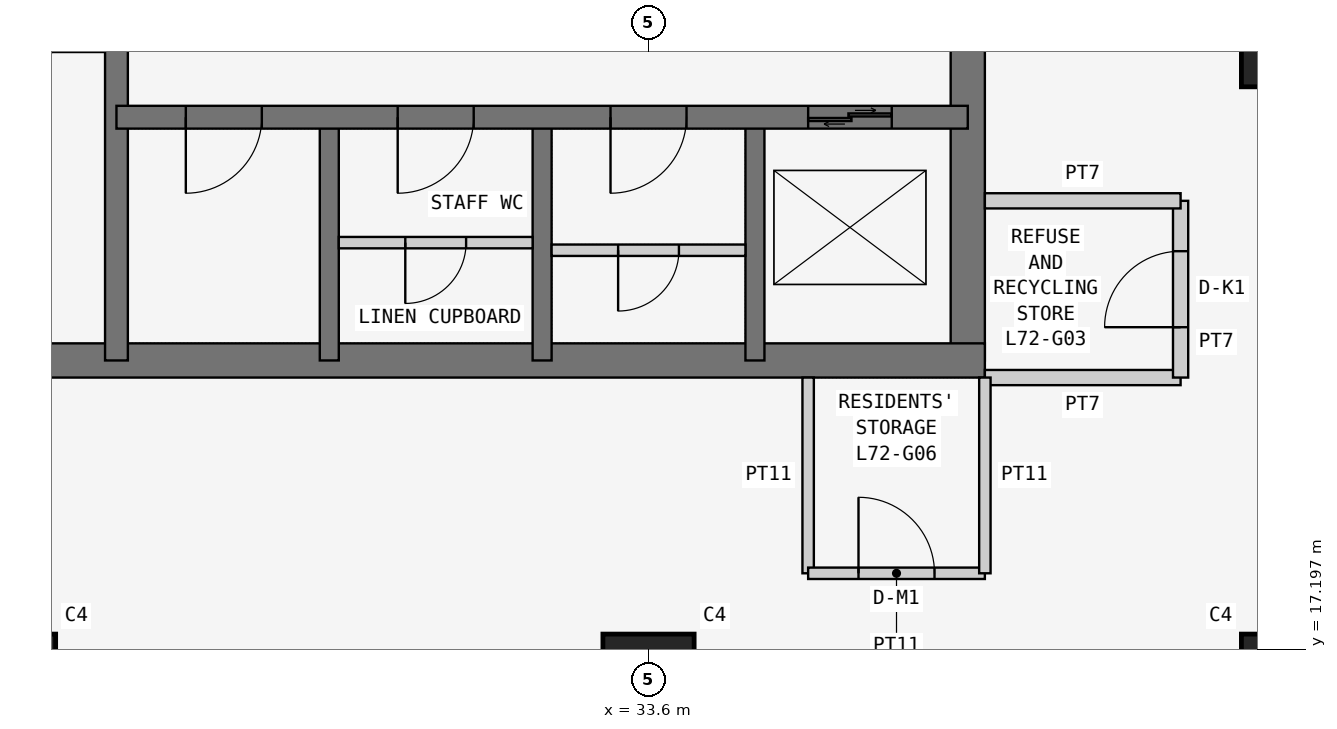
"""IFC4 building model, lengths in metres.
Left out: names, types, materials, properties, quantities, classifications, styles, units other than length and angle.
Written with IfcOpenShell. Run it as: python <this file> out.ifc"""

import sys

from ifc_helpers import new_model, si_unit, direction, frame, frame_2d, origin, origin_2d, place, context, subcontext, project, spatial, rectangle, extrude, element, fill, save


model = new_model("IFC4")
c1 = context("Model", 3, precision=1e-05, world=origin(), true_north=direction((0.0, 1.0)))
c2 = subcontext(c1, "Body", "Model", "MODEL_VIEW")
j1 = project(units=[si_unit("LENGTHUNIT", "METRE"), si_unit("PLANEANGLEUNIT", "RADIAN")], contexts=[c1])
p1 = place(None, origin())
s1 = spatial("IfcSite", under=j1, at=p1, CompositionType="ELEMENT")
p2 = place(p1, origin())
s2 = spatial("IfcBuilding", under=s1, at=p2, CompositionType="ELEMENT")
p3 = place(p2, frame((0.0, 0.0, 275.7)))
s3 = spatial("IfcBuildingStorey", under=s2, at=p3, CompositionType="ELEMENT", Elevation=275.7)
for number, where, z_axis, x_axis in (
    (1, (25.2, 16.8, 0.0), (0.0, 0.0, 1.0), (1.0, 0.0, 0.0)),
    (2, (33.6, 16.8, 0.0), (0.0, 0.0, 1.0), (1.0, 0.0, 0.0)),
    (3, (42.0, 16.8, 0.0), (0.0, 0.0, 1.0), (1.0, 0.0, 0.0)),
    (4, (42.0, 25.2, 0.0), (0.0, 0.0, 1.0), (1.0, 0.0, 0.0)),
):
    element("IfcColumn", number, at=place(p3, frame(where, z_axis=z_axis, x_axis=x_axis)), inside=s3, PredefinedType="COLUMN", context=c2, shape_type="SweptSolid", body=[
        extrude(rectangle(XDim=1.2, YDim=1.2, at=origin_2d()), origin(), (0.0, 0.0, 1.0), 3.6),
    ])
p4 = place(p3, frame((21.0, 21.0, 0.0), z_axis=(0.0, 0.0, 1.0), x_axis=(1.0, 0.0, 0.0)))
e5 = element("IfcWall", 5, at=p4, inside=s3, PredefinedType="SHEAR", context=c2, shape_type="SweptSolid", body=[
    extrude(rectangle(XDim=17.025, YDim=0.45, at=frame_2d((8.512, 0.0))), origin(), (0.0, 0.0, 1.0), 3.6),
])
p5 = place(p3, frame((37.8, 21.0, 0.0), z_axis=(0.0, 0.0, 1.0), x_axis=(0.0, 1.0, 0.0)))
e6 = element("IfcWall", 6, at=p5, inside=s3, PredefinedType="SHEAR", context=c2, shape_type="SweptSolid", body=[
    extrude(rectangle(XDim=17.025, YDim=0.45, at=frame_2d((8.512, 0.0))), origin(), (0.0, 0.0, 1.0), 3.6),
])
p6 = place(p5, frame((5.2, 0.0, 0.0)))
e7 = element("IfcOpeningElement", 7, at=p6, cuts=e6, PredefinedType="OPENING", context=c2, shape_type="SweptSolid", body=[
    extrude(rectangle(XDim=1.2, YDim=2.1, at=frame_2d((0.6, 1.05))), frame((0.0, 0.235, 0.0), z_axis=(0.0, -1.0, 0.0), x_axis=(1.0, 0.0, 0.0)), (0.0, 0.0, 1.0), 0.47),
])
p7 = place(p3, frame((26.6, 21.0, 0.0), z_axis=(0.0, 0.0, 1.0), x_axis=(0.0, 1.0, 0.0)))
e8 = element("IfcWall", 8, at=p7, inside=s3, PredefinedType="SHEAR", context=c2, shape_type="SweptSolid", body=[
    extrude(rectangle(XDim=16.8, YDim=0.3, at=frame_2d((8.4, 0.0))), origin(), (0.0, 0.0, 1.0), 3.6),
])
p8 = place(p7, frame((10.4, 0.0, 0.0)))
e9 = element("IfcOpeningElement", 9, at=p8, cuts=e8, PredefinedType="OPENING", context=c2, shape_type="SweptSolid", body=[
    extrude(rectangle(XDim=1.2, YDim=2.1, at=frame_2d((0.6, 1.05))), frame((0.0, 0.16, 0.0), z_axis=(0.0, -1.0, 0.0), x_axis=(1.0, 0.0, 0.0)), (0.0, 0.0, 1.0), 0.32),
])
p9 = place(p3, frame((26.6, 24.2, 0.0), z_axis=(0.0, 0.0, 1.0), x_axis=(1.0, 0.0, 0.0)))
e10 = element("IfcWall", 10, at=p9, inside=s3, PredefinedType="SHEAR", context=c2, shape_type="SweptSolid", body=[
    extrude(rectangle(XDim=11.2, YDim=0.3, at=frame_2d((5.6, 0.0))), origin(), (0.0, 0.0, 1.0), 3.6),
])
p10 = place(p9, frame((0.913, 0.0, 0.0)))
e11 = element("IfcOpeningElement", 11, at=p10, cuts=e10, PredefinedType="OPENING", context=c2, shape_type="SweptSolid", body=[
    extrude(rectangle(XDim=1.0, YDim=2.1, at=frame_2d((0.5, 1.05))), frame((0.0, 0.16, 0.0), z_axis=(0.0, -1.0, 0.0), x_axis=(1.0, 0.0, 0.0)), (0.0, 0.0, 1.0), 0.32),
])
p11 = place(p9, frame((3.7, 0.0, 0.0)))
e12 = element("IfcOpeningElement", 12, at=p11, cuts=e10, PredefinedType="OPENING", context=c2, shape_type="SweptSolid", body=[
    extrude(rectangle(XDim=1.0, YDim=2.1, at=frame_2d((0.5, 1.05))), frame((0.0, 0.16, 0.0), z_axis=(0.0, -1.0, 0.0), x_axis=(1.0, 0.0, 0.0)), (0.0, 0.0, 1.0), 0.32),
])
p12 = place(p9, frame((6.5, 0.0, 0.0)))
e13 = element("IfcOpeningElement", 13, at=p12, cuts=e10, PredefinedType="OPENING", context=c2, shape_type="SweptSolid", body=[
    extrude(rectangle(XDim=1.0, YDim=2.1, at=frame_2d((0.5, 1.05))), frame((0.0, 0.16, 0.0), z_axis=(0.0, -1.0, 0.0), x_axis=(1.0, 0.0, 0.0)), (0.0, 0.0, 1.0), 0.32),
])
p13 = place(p9, frame((9.1, 0.0, 0.0)))
e14 = element("IfcOpeningElement", 14, at=p13, cuts=e10, PredefinedType="OPENING", context=c2, shape_type="SweptSolid", body=[
    extrude(rectangle(XDim=1.1, YDim=2.1, at=frame_2d((0.55, 1.05))), frame((0.0, 0.16, 0.0), z_axis=(0.0, -1.0, 0.0), x_axis=(1.0, 0.0, 0.0)), (0.0, 0.0, 1.0), 0.32),
])
for number, where, z_axis, x_axis in (
    (15, (29.4, 21.0, 0.0), (0.0, 0.0, 1.0), (0.0, 1.0, 0.0)),
    (16, (32.2, 21.0, 0.0), (0.0, 0.0, 1.0), (0.0, 1.0, 0.0)),
    (17, (35.0, 21.0, 0.0), (0.0, 0.0, 1.0), (0.0, 1.0, 0.0)),
):
    element("IfcWall", number, at=place(p3, frame(where, z_axis=z_axis, x_axis=x_axis)), inside=s3, PredefinedType="SHEAR", context=c2, shape_type="SweptSolid", body=[
        extrude(rectangle(XDim=3.2, YDim=0.25, at=frame_2d((1.6, 0.0))), origin(), (0.0, 0.0, 1.0), 3.6),
    ])
p14 = place(p3, frame((38.025, 20.775, 0.0), z_axis=(0.0, 0.0, 1.0), x_axis=(1.0, 0.0, 0.0)))
e18 = element("IfcWall", 18, at=p14, inside=s3, PredefinedType="PARTITIONING", context=c2, shape_type="SweptSolid", body=[
    extrude(rectangle(XDim=2.575, YDim=0.2, at=frame_2d((1.288, 0.0))), origin(), (0.0, 0.0, 1.0), 3.45),
])
p15 = place(p3, frame((40.6, 20.775, 0.0), z_axis=(0.0, 0.0, 1.0), x_axis=(0.0, 1.0, 0.0)))
e19 = element("IfcWall", 19, at=p15, inside=s3, PredefinedType="PARTITIONING", context=c2, shape_type="SweptSolid", body=[
    extrude(rectangle(XDim=2.325, YDim=0.2, at=frame_2d((1.163, 0.0))), origin(), (0.0, 0.0, 1.0), 3.45),
])
p16 = place(p15, frame((0.663, 0.0, 0.0)))
e20 = element("IfcOpeningElement", 20, at=p16, cuts=e19, PredefinedType="OPENING", context=c2, shape_type="SweptSolid", body=[
    extrude(rectangle(XDim=1.0, YDim=2.1, at=frame_2d((0.5, 1.05))), frame((0.0, 0.11, 0.0), z_axis=(0.0, -1.0, 0.0), x_axis=(1.0, 0.0, 0.0)), (0.0, 0.0, 1.0), 0.22),
])
p17 = place(p3, frame((40.6, 23.1, 0.0), z_axis=(0.0, 0.0, 1.0), x_axis=(-1.0, 0.0, 0.0)))
e21 = element("IfcWall", 21, at=p17, inside=s3, PredefinedType="PARTITIONING", context=c2, shape_type="SweptSolid", body=[
    extrude(rectangle(XDim=2.575, YDim=0.2, at=frame_2d((1.288, 0.0))), origin(), (0.0, 0.0, 1.0), 3.45),
])
p18 = place(p3, frame((35.7, 20.775, 0.0), z_axis=(0.0, 0.0, 1.0), x_axis=(0.0, -1.0, 0.0)))
e22 = element("IfcWall", 22, at=p18, inside=s3, PredefinedType="PARTITIONING", context=c2, shape_type="SweptSolid", body=[
    extrude(rectangle(XDim=2.575, YDim=0.15, at=frame_2d((1.288, 0.0))), origin(), (0.0, 0.0, 1.0), 3.45),
])
p19 = place(p3, frame((35.7, 18.2, 0.0), z_axis=(0.0, 0.0, 1.0), x_axis=(1.0, 0.0, 0.0)))
e23 = element("IfcWall", 23, at=p19, inside=s3, PredefinedType="PARTITIONING", context=c2, shape_type="SweptSolid", body=[
    extrude(rectangle(XDim=2.325, YDim=0.15, at=frame_2d((1.163, 0.0))), origin(), (0.0, 0.0, 1.0), 3.45),
])
p20 = place(p19, frame((0.663, 0.0, 0.0)))
e24 = element("IfcOpeningElement", 24, at=p20, cuts=e23, PredefinedType="OPENING", context=c2, shape_type="SweptSolid", body=[
    extrude(rectangle(XDim=1.0, YDim=2.1, at=frame_2d((0.5, 1.05))), frame((0.0, 0.085, 0.0), z_axis=(0.0, -1.0, 0.0), x_axis=(1.0, 0.0, 0.0)), (0.0, 0.0, 1.0), 0.17),
])
p21 = place(p3, frame((38.025, 18.2, 0.0), z_axis=(0.0, 0.0, 1.0), x_axis=(0.0, 1.0, 0.0)))
e25 = element("IfcWall", 25, at=p21, inside=s3, PredefinedType="PARTITIONING", context=c2, shape_type="SweptSolid", body=[
    extrude(rectangle(XDim=2.575, YDim=0.15, at=frame_2d((1.288, 0.0))), origin(), (0.0, 0.0, 1.0), 3.45),
])
p22 = place(p3, frame((29.525, 22.55, 0.0), z_axis=(0.0, 0.0, 1.0), x_axis=(1.0, 0.0, 0.0)))
e26 = element("IfcWall", 26, at=p22, inside=s3, PredefinedType="PARTITIONING", context=c2, shape_type="SweptSolid", body=[
    extrude(rectangle(XDim=2.55, YDim=0.15, at=frame_2d((1.275, 0.0))), origin(), (0.0, 0.0, 1.0), 3.45),
])
p23 = place(p22, frame((0.875, 0.0, 0.0)))
e27 = element("IfcOpeningElement", 27, at=p23, cuts=e26, PredefinedType="OPENING", context=c2, shape_type="SweptSolid", body=[
    extrude(rectangle(XDim=0.8, YDim=2.1, at=frame_2d((0.4, 1.05))), frame((0.0, 0.085, 0.0), z_axis=(0.0, -1.0, 0.0), x_axis=(1.0, 0.0, 0.0)), (0.0, 0.0, 1.0), 0.17),
])
p24 = place(p3, frame((32.325, 22.45, 0.0), z_axis=(0.0, 0.0, 1.0), x_axis=(1.0, 0.0, 0.0)))
e28 = element("IfcWall", 28, at=p24, inside=s3, PredefinedType="PARTITIONING", context=c2, shape_type="SweptSolid", body=[
    extrude(rectangle(XDim=2.55, YDim=0.15, at=frame_2d((1.275, 0.0))), origin(), (0.0, 0.0, 1.0), 3.45),
])
p25 = place(p24, frame((0.875, 0.0, 0.0)))
e29 = element("IfcOpeningElement", 29, at=p25, cuts=e28, PredefinedType="OPENING", context=c2, shape_type="SweptSolid", body=[
    extrude(rectangle(XDim=0.8, YDim=2.1, at=frame_2d((0.4, 1.05))), frame((0.0, 0.085, 0.0), z_axis=(0.0, -1.0, 0.0), x_axis=(1.0, 0.0, 0.0)), (0.0, 0.0, 1.0), 0.17),
])
p26 = place(p16, origin())
e30 = element("IfcDoor", 30, at=p26, inside=s3, OperationType="SINGLE_SWING_LEFT", PredefinedType="DOOR", context=c2, shape_type="SweptSolid", body=[
    extrude(rectangle(XDim=1.0, YDim=2.1, at=frame_2d((0.5, 1.05))), frame((0.0, 0.025, 0.0), z_axis=(0.0, -1.0, 0.0), x_axis=(1.0, 0.0, 0.0)), (0.0, 0.0, 1.0), 0.05),
])
fill(e20, e30)
p27 = place(p20, origin())
e31 = element("IfcDoor", 31, at=p27, inside=s3, OperationType="SINGLE_SWING_LEFT", PredefinedType="DOOR", context=c2, shape_type="SweptSolid", body=[
    extrude(rectangle(XDim=1.0, YDim=2.1, at=frame_2d((0.5, 1.05))), frame((0.0, 0.025, 0.0), z_axis=(0.0, -1.0, 0.0), x_axis=(1.0, 0.0, 0.0)), (0.0, 0.0, 1.0), 0.05),
])
fill(e24, e31)
p28 = place(p10, frame((1.0, 0.0, 0.0), z_axis=(0.0, 0.0, 1.0), x_axis=(-1.0, 0.0, 0.0)))
e32 = element("IfcDoor", 32, at=p28, inside=s3, OperationType="SINGLE_SWING_RIGHT", PredefinedType="DOOR", context=c2, shape_type="SweptSolid", body=[
    extrude(rectangle(XDim=1.0, YDim=2.1, at=frame_2d((0.5, 1.05))), frame((0.0, 0.025, 0.0), z_axis=(0.0, -1.0, 0.0), x_axis=(1.0, 0.0, 0.0)), (0.0, 0.0, 1.0), 0.05),
])
fill(e11, e32)
p29 = place(p11, frame((1.0, 0.0, 0.0), z_axis=(0.0, 0.0, 1.0), x_axis=(-1.0, 0.0, 0.0)))
e33 = element("IfcDoor", 33, at=p29, inside=s3, OperationType="SINGLE_SWING_RIGHT", PredefinedType="DOOR", context=c2, shape_type="SweptSolid", body=[
    extrude(rectangle(XDim=1.0, YDim=2.1, at=frame_2d((0.5, 1.05))), frame((0.0, 0.025, 0.0), z_axis=(0.0, -1.0, 0.0), x_axis=(1.0, 0.0, 0.0)), (0.0, 0.0, 1.0), 0.05),
])
fill(e12, e33)
p30 = place(p23, frame((0.8, 0.0, 0.0), z_axis=(0.0, 0.0, 1.0), x_axis=(-1.0, 0.0, 0.0)))
e34 = element("IfcDoor", 34, at=p30, inside=s3, OperationType="SINGLE_SWING_RIGHT", PredefinedType="DOOR", context=c2, shape_type="SweptSolid", body=[
    extrude(rectangle(XDim=0.8, YDim=2.1, at=frame_2d((0.4, 1.05))), frame((0.0, 0.025, 0.0), z_axis=(0.0, -1.0, 0.0), x_axis=(1.0, 0.0, 0.0)), (0.0, 0.0, 1.0), 0.05),
])
fill(e27, e34)
p31 = place(p12, frame((1.0, 0.0, 0.0), z_axis=(0.0, 0.0, 1.0), x_axis=(-1.0, 0.0, 0.0)))
e35 = element("IfcDoor", 35, at=p31, inside=s3, OperationType="SINGLE_SWING_RIGHT", PredefinedType="DOOR", context=c2, shape_type="SweptSolid", body=[
    extrude(rectangle(XDim=1.0, YDim=2.1, at=frame_2d((0.5, 1.05))), frame((0.0, 0.025, 0.0), z_axis=(0.0, -1.0, 0.0), x_axis=(1.0, 0.0, 0.0)), (0.0, 0.0, 1.0), 0.05),
])
fill(e13, e35)
p32 = place(p25, frame((0.8, 0.0, 0.0), z_axis=(0.0, 0.0, 1.0), x_axis=(-1.0, 0.0, 0.0)))
e36 = element("IfcDoor", 36, at=p32, inside=s3, OperationType="SINGLE_SWING_RIGHT", PredefinedType="DOOR", context=c2, shape_type="SweptSolid", body=[
    extrude(rectangle(XDim=0.8, YDim=2.1, at=frame_2d((0.4, 1.05))), frame((0.0, 0.025, 0.0), z_axis=(0.0, -1.0, 0.0), x_axis=(1.0, 0.0, 0.0)), (0.0, 0.0, 1.0), 0.05),
])
fill(e29, e36)
p33 = place(p13, origin())
e37 = element("IfcDoor", 37, at=p33, inside=s3, OperationType="DOUBLE_DOOR_SLIDING", PredefinedType="DOOR", context=c2, shape_type="SweptSolid", body=[
    extrude(rectangle(XDim=1.1, YDim=2.1, at=frame_2d((0.55, 1.05))), frame((0.0, 0.025, 0.0), z_axis=(0.0, -1.0, 0.0), x_axis=(1.0, 0.0, 0.0)), (0.0, 0.0, 1.0), 0.05),
])
fill(e14, e37)
save(model, sys.argv[1])
